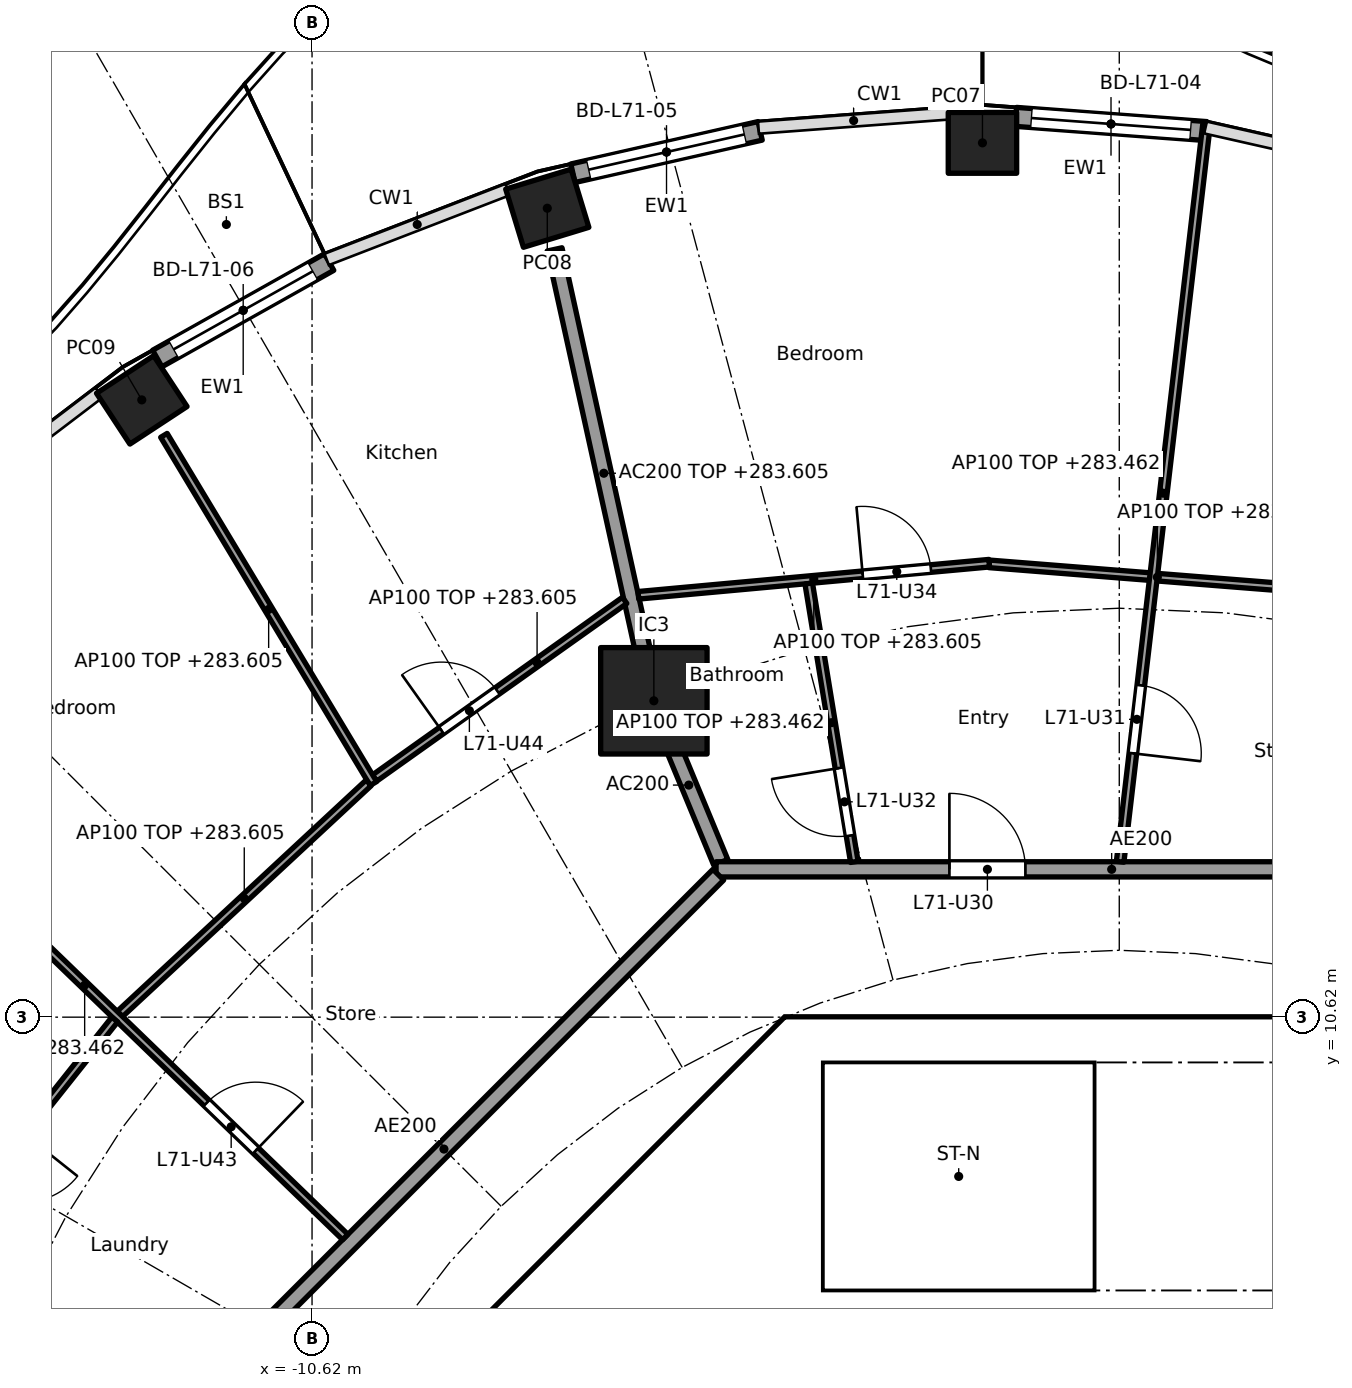
"""IFC4 building model, lengths in metres.
Left out: names, types, materials, properties, quantities, classifications, styles, units other than length and angle.
Written with IfcOpenShell. Run it as: python <this file> out.ifc"""

import sys

from ifc_helpers import new_model, si_unit, direction, frame, frame_2d, origin, origin_2d, place, context, subcontext, project, spatial, polyline, rectangle, hollow_rectangle, outline, extrude, element, fill, save


model = new_model("IFC4")
c1 = context("Model", 3, precision=1e-05, world=origin(), true_north=direction((0.0, 1.0)))
c2 = subcontext(c1, "Body", "Model", "MODEL_VIEW")
j1 = project(units=[si_unit("LENGTHUNIT", "METRE"), si_unit("PLANEANGLEUNIT", "RADIAN")], contexts=[c1])
p1 = place(None, origin())
s1 = spatial("IfcSite", under=j1, at=p1, CompositionType="ELEMENT")
p2 = place(p1, origin())
s2 = spatial("IfcBuilding", under=s1, at=p2, CompositionType="ELEMENT")
p3 = place(p2, frame((0.0, 0.0, 280.7)))
s3 = spatial("IfcBuildingStorey", under=s2, at=p3, CompositionType="ELEMENT", Elevation=280.7)
for number, where, z_axis, x_axis in (
    (1, (-1.8, 22.122, 0.0), (0.0, 0.0, 1.0), (-1.0, 0.0, 0.0)),
    (2, (-7.525, 21.262, 0.0), (0.0, 0.0, 1.0), (-0.957, -0.292, 0.0)),
    (3, (-12.86, 18.741, 0.0), (0.0, 0.0, 1.0), (-0.836, -0.549, 0.0)),
):
    element("IfcColumn", number, at=place(p3, frame(where, z_axis=z_axis, x_axis=x_axis)), inside=s3, PredefinedType="COLUMN", context=c2, shape_type="SweptSolid", body=[
        extrude(hollow_rectangle(XDim=0.9, YDim=0.8, WallThickness=0.028, at=origin_2d()), origin(), (0.0, 0.0, 1.0), 3.7),
    ])
p4 = place(p3, frame((-6.123, 14.782, 0.0), z_axis=(0.0, 0.0, 1.0), x_axis=(1.0, 0.0, 0.0)))
e4 = element("IfcColumn", 4, at=p4, inside=s3, PredefinedType="COLUMN", context=c2, shape_type="SweptSolid", body=[
    extrude(rectangle(XDim=1.4, YDim=1.4, at=origin_2d()), origin(), (0.0, 0.0, 1.0), 3.7),
])
p5 = place(p3, frame((-1.361, 22.464, 0.0), z_axis=(0.0, 0.0, 1.0), x_axis=(0.997229684519, -0.074383844448, 0.0)))
e5 = element("IfcWall", 5, at=p5, inside=s3, PredefinedType="SOLIDWALL", context=c2, shape_type="SweptSolid", body=[
    extrude(rectangle(XDim=2.511, YDim=0.25, at=frame_2d((1.255, 0.0))), origin(), (0.0, 0.0, 1.0), 3.44),
])
p6 = place(p5, frame((0.205, 0.0, 0.0)))
e6 = element("IfcOpeningElement", 6, at=p6, cuts=e5, PredefinedType="OPENING", context=c2, shape_type="SweptSolid", body=[
    extrude(rectangle(XDim=2.1, YDim=2.4, at=frame_2d((1.05, 1.2))), frame((0.0, 0.135, 0.0), z_axis=(0.0, -1.0, 0.0), x_axis=(1.0, 0.0, 0.0)), (0.0, 0.0, 1.0), 0.27),
])
p7 = place(p3, frame((-7.188, 21.723, 0.0), z_axis=(0.0, 0.0, 1.0), x_axis=(0.975319584032, 0.220797891756, 0.0)))
e7 = element("IfcWall", 7, at=p7, inside=s3, PredefinedType="SOLIDWALL", context=c2, shape_type="SweptSolid", body=[
    extrude(rectangle(XDim=2.525, YDim=0.25, at=frame_2d((1.263, 0.0))), origin(), (0.0, 0.0, 1.0), 3.44),
])
p8 = place(p7, frame((0.213, 0.0, 0.0)))
e8 = element("IfcOpeningElement", 8, at=p8, cuts=e7, PredefinedType="OPENING", context=c2, shape_type="SweptSolid", body=[
    extrude(rectangle(XDim=2.1, YDim=2.4, at=frame_2d((1.05, 1.2))), frame((0.0, 0.135, 0.0), z_axis=(0.0, -1.0, 0.0), x_axis=(1.0, 0.0, 0.0)), (0.0, 0.0, 1.0), 0.27),
])
p9 = place(p3, frame((-12.656, 19.285, 0.0), z_axis=(0.0, 0.0, 1.0), x_axis=(0.872075426507, 0.489371485154, 0.0)))
e9 = element("IfcWall", 9, at=p9, inside=s3, PredefinedType="SOLIDWALL", context=c2, shape_type="SweptSolid", body=[
    extrude(rectangle(XDim=2.593, YDim=0.25, at=frame_2d((1.297, 0.0))), origin(), (0.0, 0.0, 1.0), 3.44),
])
p10 = place(p9, frame((0.247, 0.0, 0.0)))
e10 = element("IfcOpeningElement", 10, at=p10, cuts=e9, PredefinedType="OPENING", context=c2, shape_type="SweptSolid", body=[
    extrude(rectangle(XDim=2.1, YDim=2.4, at=frame_2d((1.05, 1.2))), frame((0.0, 0.135, 0.0), z_axis=(0.0, -1.0, 0.0), x_axis=(1.0, 0.0, 0.0)), (0.0, 0.0, 1.0), 0.27),
])
p11 = place(p3, frame((-4.613, 9.988, 0.0), z_axis=(0.0, 0.0, 1.0), x_axis=(-0.707106781187, -0.707106781187, 0.0)))
e11 = element("IfcWall", 11, at=p11, inside=s3, PredefinedType="SHEAR", context=c2, shape_type="SweptSolid", body=[
    extrude(rectangle(XDim=7.602, YDim=0.6, at=frame_2d((3.801, 0.0))), origin(), (0.0, 0.0, 1.0), 3.44),
])
p12 = place(p11, frame((0.351, 0.0, 0.0)))
e12 = element("IfcOpeningElement", 12, at=p12, cuts=e11, PredefinedType="OPENING", context=c2, shape_type="SweptSolid", body=[
    extrude(rectangle(XDim=1.1, YDim=2.1, at=frame_2d((0.55, 1.05))), frame((0.0, 0.31, 0.0), z_axis=(0.0, -1.0, 0.0), x_axis=(1.0, 0.0, 0.0)), (0.0, 0.0, 1.0), 0.62),
])
p13 = place(p3, frame((-5.8, 4.3, 0.0), z_axis=(0.0, 0.0, 1.0), x_axis=(0.0, 1.0, 0.0)))
e13 = element("IfcWall", 13, at=p13, inside=s3, PredefinedType="PARTITIONING", context=c2, shape_type="SweptSolid", body=[
    extrude(rectangle(XDim=3.927, YDim=0.15, at=frame_2d((1.963, 0.0))), origin(), (0.0, 0.0, 1.0), 3.44),
])
p14 = place(p13, frame((0.262, 0.0, 0.0)))
e14 = element("IfcOpeningElement", 14, at=p14, cuts=e13, PredefinedType="OPENING", context=c2, shape_type="SweptSolid", body=[
    extrude(rectangle(XDim=0.9, YDim=2.1, at=frame_2d((0.45, 1.05))), frame((0.0, 0.085, 0.0), z_axis=(0.0, -1.0, 0.0), x_axis=(1.0, 0.0, 0.0)), (0.0, 0.0, 1.0), 0.17),
])
p15 = place(p13, frame((2.338, 0.0, 0.0)))
e15 = element("IfcOpeningElement", 15, at=p15, cuts=e13, PredefinedType="OPENING", context=c2, shape_type="SweptSolid", body=[
    extrude(rectangle(XDim=0.9, YDim=2.1, at=frame_2d((0.45, 1.05))), frame((0.0, 0.085, 0.0), z_axis=(0.0, -1.0, 0.0), x_axis=(1.0, 0.0, 0.0)), (0.0, 0.0, 1.0), 0.17),
])
p16 = place(p3, origin())
e16 = element("IfcWall", 16, at=p16, inside=s3, PredefinedType="SHEAR", context=c2, shape_type="SweptSolid", body=[
    extrude(outline(polyline([(-4.152, 10.025), (-4.401, 9.776), (-4.825, 10.2), (-4.401, 10.625), (4.401, 10.625), (4.825, 10.2), (4.401, 9.776), (4.152, 10.025), (-4.152, 10.025)])), origin(), (0.0, 0.0, 1.0), 3.44),
])
p17 = place(p3, origin())
e17 = element("IfcWall", 17, at=p17, inside=s3, PredefinedType="SOLIDWALL", context=c2, shape_type="SweptSolid", body=[
    extrude(outline(polyline([(-3.9, 7.025), (-4.1, 7.025), (-4.1, 10.025), (-3.9, 10.025), (-3.9, 7.025)])), origin(), (0.0, 0.0, 1.0), 3.44),
])
p18 = place(p3, origin())
e18 = element("IfcWall", 18, at=p18, inside=s3, PredefinedType="SOLIDWALL", context=c2, shape_type="SweptSolid", body=[
    extrude(outline(polyline([(4.1, 6.5), (-4.1, 6.5), (-4.1, 7.025), (4.1, 7.025), (4.1, 6.5)])), origin(), (0.0, 0.0, 1.0), 3.44),
])
p19 = place(p3, frame((-5.243, 12.657, 0.0), z_axis=(0.0, 0.0, 1.0), x_axis=(-0.38273085373, 0.923859888513, 0.0)))
e19 = element("IfcWall", 19, at=p19, inside=s3, PredefinedType="PARTITIONING", context=c2, shape_type="SweptSolid", body=[
    extrude(rectangle(XDim=2.199, YDim=0.2, at=frame_2d((1.1, 0.0))), origin(), (0.0, 0.0, 1.0), 3.44),
])
p20 = place(p3, frame((-6.134, 14.831, 0.0), z_axis=(0.0, 0.0, 1.0), x_axis=(-0.214842475666, 0.976648714047, 0.0)))
e20 = element("IfcWall", 20, at=p20, inside=s3, PredefinedType="PARTITIONING", context=c2, shape_type="SweptSolid", body=[
    extrude(rectangle(XDim=6.031, YDim=0.2, at=frame_2d((3.015, 0.0))), origin(), (0.0, 0.0, 1.0), 2.905),
])
p21 = place(p3, frame((5.104, 12.565, 0.0), z_axis=(0.0, 0.0, 1.0), x_axis=(-1.0, 0.0, 0.0)))
e21 = element("IfcWall", 21, at=p21, inside=s3, PredefinedType="PARTITIONING", context=c2, shape_type="SweptSolid", body=[
    extrude(rectangle(XDim=10.409, YDim=0.2, at=frame_2d((5.205, 0.0))), origin(), (0.0, 0.0, 1.0), 3.44),
])
p22 = place(p21, frame((6.339, 0.0, 0.0)))
e22 = element("IfcOpeningElement", 22, at=p22, cuts=e21, PredefinedType="OPENING", context=c2, shape_type="SweptSolid", body=[
    extrude(rectangle(XDim=1.0, YDim=2.1, at=frame_2d((0.5, 1.05))), frame((0.0, 0.11, 0.0), z_axis=(0.0, -1.0, 0.0), x_axis=(1.0, 0.0, 0.0)), (0.0, 0.0, 1.0), 0.22),
])
p23 = place(p3, frame((-5.275, 12.494, 0.0), z_axis=(0.0, 0.0, 1.0), x_axis=(-0.707106781187, -0.707106781187, 0.0)))
e23 = element("IfcWall", 23, at=p23, inside=s3, PredefinedType="PARTITIONING", context=c2, shape_type="SweptSolid", body=[
    extrude(rectangle(XDim=10.209, YDim=0.2, at=frame_2d((5.104, 0.0))), origin(), (0.0, 0.0, 1.0), 3.44),
])
p24 = place(p3, frame((2.713, 16.233, 0.0), z_axis=(0.0, 0.0, 1.0), x_axis=(-0.996870142942, 0.079056423588, 0.0)))
e24 = element("IfcWall", 24, at=p24, inside=s3, PredefinedType="PARTITIONING", context=c2, shape_type="SweptSolid", body=[
    extrude(rectangle(XDim=4.438, YDim=0.1, at=frame_2d((2.219, 0.0))), origin(), (0.0, 0.0, 1.0), 2.905),
])
p25 = place(p3, frame((0.012, 12.664, 0.0), z_axis=(0.0, 0.0, 1.0), x_axis=(0.11636251357, 0.993206808996, 0.0)))
e25 = element("IfcWall", 25, at=p25, inside=s3, PredefinedType="PARTITIONING", context=c2, shape_type="SweptSolid", body=[
    extrude(rectangle(XDim=9.765, YDim=0.1, at=frame_2d((4.882, 0.0))), origin(), (0.0, 0.0, 1.0), 2.762),
])
p26 = place(p25, frame((1.437, 0.0, 0.0)))
e26 = element("IfcOpeningElement", 26, at=p26, cuts=e25, PredefinedType="OPENING", context=c2, shape_type="SweptSolid", body=[
    extrude(rectangle(XDim=0.9, YDim=2.1, at=frame_2d((0.45, 1.05))), frame((0.0, 0.06, 0.0), z_axis=(0.0, -1.0, 0.0), x_axis=(1.0, 0.0, 0.0)), (0.0, 0.0, 1.0), 0.12),
])
p27 = place(p3, frame((-1.711, 16.592, 0.0), z_axis=(0.0, 0.0, 1.0), x_axis=(-0.995843837247, -0.091077175065, 0.0)))
e27 = element("IfcWall", 27, at=p27, inside=s3, PredefinedType="PARTITIONING", context=c2, shape_type="SweptSolid", body=[
    extrude(rectangle(XDim=4.635, YDim=0.1, at=frame_2d((2.317, 0.0))), origin(), (0.0, 0.0, 1.0), 2.905),
])
p28 = place(p27, frame((0.771, 0.0, 0.0)))
e28 = element("IfcOpeningElement", 28, at=p28, cuts=e27, PredefinedType="OPENING", context=c2, shape_type="SweptSolid", body=[
    extrude(rectangle(XDim=0.9, YDim=2.1, at=frame_2d((0.45, 1.05))), frame((0.0, 0.06, 0.0), z_axis=(0.0, -1.0, 0.0), x_axis=(1.0, 0.0, 0.0)), (0.0, 0.0, 1.0), 0.12),
])
p29 = place(p3, frame((-3.486, 12.663, 0.0), z_axis=(0.0, 0.0, 1.0), x_axis=(-0.161602751674, 0.986855891532, 0.0)))
e29 = element("IfcWall", 29, at=p29, inside=s3, PredefinedType="PARTITIONING", context=c2, shape_type="SweptSolid", body=[
    extrude(rectangle(XDim=3.71, YDim=0.1, at=frame_2d((1.855, 0.0))), origin(), (0.0, 0.0, 1.0), 2.762),
])
p30 = place(p29, frame((0.35, 0.0, 0.0)))
e30 = element("IfcOpeningElement", 30, at=p30, cuts=e29, PredefinedType="OPENING", context=c2, shape_type="SweptSolid", body=[
    extrude(rectangle(XDim=0.9, YDim=2.1, at=frame_2d((0.45, 1.05))), frame((0.0, 0.06, 0.0), z_axis=(0.0, -1.0, 0.0), x_axis=(1.0, 0.0, 0.0)), (0.0, 0.0, 1.0), 0.12),
])
p31 = place(p3, frame((-6.508, 16.103, 0.0), z_axis=(0.0, 0.0, 1.0), x_axis=(-0.815202203556, -0.579176456114, 0.0)))
e31 = element("IfcWall", 31, at=p31, inside=s3, PredefinedType="PARTITIONING", context=c2, shape_type="SweptSolid", body=[
    extrude(rectangle(XDim=4.036, YDim=0.1, at=frame_2d((2.018, 0.0))), origin(), (0.0, 0.0, 1.0), 2.905),
])
p32 = place(p31, frame((2.055, 0.0, 0.0)))
e32 = element("IfcOpeningElement", 32, at=p32, cuts=e31, PredefinedType="OPENING", context=c2, shape_type="SweptSolid", body=[
    extrude(rectangle(XDim=0.9, YDim=2.1, at=frame_2d((0.45, 1.05))), frame((0.0, 0.06, 0.0), z_axis=(0.0, -1.0, 0.0), x_axis=(1.0, 0.0, 0.0)), (0.0, 0.0, 1.0), 0.12),
])
p33 = place(p3, frame((-9.813, 13.693, 0.0), z_axis=(0.0, 0.0, 1.0), x_axis=(-0.515509511815, 0.856883856324, 0.0)))
e33 = element("IfcWall", 33, at=p33, inside=s3, PredefinedType="PARTITIONING", context=c2, shape_type="SweptSolid", body=[
    extrude(rectangle(XDim=5.346, YDim=0.1, at=frame_2d((2.673, 0.0))), origin(), (0.0, 0.0, 1.0), 2.905),
])
p34 = place(p3, frame((-9.875, 13.702, 0.0), z_axis=(0.0, 0.0, 1.0), x_axis=(-0.732618266441, -0.680639754699, 0.0)))
e34 = element("IfcWall", 34, at=p34, inside=s3, PredefinedType="PARTITIONING", context=c2, shape_type="SweptSolid", body=[
    extrude(rectangle(XDim=4.467, YDim=0.1, at=frame_2d((2.233, 0.0))), origin(), (0.0, 0.0, 1.0), 2.905),
])
p35 = place(p3, frame((-10.183, 7.727, 0.0), z_axis=(0.0, 0.0, 1.0), x_axis=(-0.719063433856, 0.694944442449, 0.0)))
e35 = element("IfcWall", 35, at=p35, inside=s3, PredefinedType="PARTITIONING", context=c2, shape_type="SweptSolid", body=[
    extrude(rectangle(XDim=9.535, YDim=0.1, at=frame_2d((4.768, 0.0))), origin(), (0.0, 0.0, 1.0), 2.762),
])
p36 = place(p35, frame((6.405, 0.0, 0.0)))
e36 = element("IfcOpeningElement", 36, at=p36, cuts=e35, PredefinedType="OPENING", context=c2, shape_type="SweptSolid", body=[
    extrude(rectangle(XDim=0.9, YDim=2.1, at=frame_2d((0.45, 1.05))), frame((0.0, 0.06, 0.0), z_axis=(0.0, -1.0, 0.0), x_axis=(1.0, 0.0, 0.0)), (0.0, 0.0, 1.0), 0.12),
])
p37 = place(p35, frame((1.637, 0.0, 0.0)))
e37 = element("IfcOpeningElement", 37, at=p37, cuts=e35, PredefinedType="OPENING", context=c2, shape_type="SweptSolid", body=[
    extrude(rectangle(XDim=0.9, YDim=2.1, at=frame_2d((0.45, 1.05))), frame((0.0, 0.06, 0.0), z_axis=(0.0, -1.0, 0.0), x_axis=(1.0, 0.0, 0.0)), (0.0, 0.0, 1.0), 0.12),
])
p38 = place(p3, frame((-13.216, 10.589, 0.0), z_axis=(0.0, 0.0, 1.0), x_axis=(-0.622272178674, -0.782800955319, 0.0)))
e38 = element("IfcWall", 38, at=p38, inside=s3, PredefinedType="PARTITIONING", context=c2, shape_type="SweptSolid", body=[
    extrude(rectangle(XDim=4.786, YDim=0.1, at=frame_2d((2.393, 0.0))), origin(), (0.0, 0.0, 1.0), 2.905),
])
p39 = place(p38, frame((1.918, 0.0, 0.0)))
e39 = element("IfcOpeningElement", 39, at=p39, cuts=e38, PredefinedType="OPENING", context=c2, shape_type="SweptSolid", body=[
    extrude(rectangle(XDim=0.9, YDim=2.1, at=frame_2d((0.45, 1.05))), frame((0.0, 0.06, 0.0), z_axis=(0.0, -1.0, 0.0), x_axis=(1.0, 0.0, 0.0)), (0.0, 0.0, 1.0), 0.12),
])
p40 = place(p6, origin())
e40 = element("IfcDoor", 40, at=p40, inside=s3, OperationType="SLIDING_TO_LEFT", PredefinedType="DOOR", context=c2, shape_type="SweptSolid", body=[
    extrude(rectangle(XDim=2.1, YDim=2.4, at=frame_2d((1.05, 1.2))), frame((0.0, 0.025, 0.0), z_axis=(0.0, -1.0, 0.0), x_axis=(1.0, 0.0, 0.0)), (0.0, 0.0, 1.0), 0.05),
])
fill(e6, e40)
p41 = place(p8, origin())
e41 = element("IfcDoor", 41, at=p41, inside=s3, OperationType="SLIDING_TO_LEFT", PredefinedType="DOOR", context=c2, shape_type="SweptSolid", body=[
    extrude(rectangle(XDim=2.1, YDim=2.4, at=frame_2d((1.05, 1.2))), frame((0.0, 0.025, 0.0), z_axis=(0.0, -1.0, 0.0), x_axis=(1.0, 0.0, 0.0)), (0.0, 0.0, 1.0), 0.05),
])
fill(e8, e41)
p42 = place(p10, origin())
e42 = element("IfcDoor", 42, at=p42, inside=s3, OperationType="SLIDING_TO_LEFT", PredefinedType="DOOR", context=c2, shape_type="SweptSolid", body=[
    extrude(rectangle(XDim=2.1, YDim=2.4, at=frame_2d((1.05, 1.2))), frame((0.0, 0.025, 0.0), z_axis=(0.0, -1.0, 0.0), x_axis=(1.0, 0.0, 0.0)), (0.0, 0.0, 1.0), 0.05),
])
fill(e10, e42)
p43 = place(p15, origin())
e43 = element("IfcDoor", 43, at=p43, inside=s3, OperationType="SINGLE_SWING_LEFT", PredefinedType="DOOR", context=c2, shape_type="SweptSolid", body=[
    extrude(rectangle(XDim=0.9, YDim=2.1, at=frame_2d((0.45, 1.05))), frame((0.0, 0.025, 0.0), z_axis=(0.0, -1.0, 0.0), x_axis=(1.0, 0.0, 0.0)), (0.0, 0.0, 1.0), 0.05),
])
fill(e15, e43)
p44 = place(p12, origin())
e44 = element("IfcDoor", 44, at=p44, inside=s3, OperationType="SINGLE_SWING_RIGHT", PredefinedType="DOOR", context=c2, shape_type="SweptSolid", body=[
    extrude(rectangle(XDim=1.1, YDim=2.1, at=frame_2d((0.55, 1.05))), frame((0.0, 0.025, 0.0), z_axis=(0.0, -1.0, 0.0), x_axis=(1.0, 0.0, 0.0)), (0.0, 0.0, 1.0), 0.05),
])
fill(e12, e44)
p45 = place(p22, frame((1.0, 0.0, 0.0), x_axis=(-1.0, 0.0, 0.0)))
e45 = element("IfcDoor", 45, at=p45, inside=s3, OperationType="SINGLE_SWING_LEFT", PredefinedType="DOOR", context=c2, shape_type="SweptSolid", body=[
    extrude(rectangle(XDim=1.0, YDim=2.1, at=frame_2d((0.5, 1.05))), frame((0.0, 0.025, 0.0), z_axis=(0.0, -1.0, 0.0), x_axis=(1.0, 0.0, 0.0)), (0.0, 0.0, 1.0), 0.05),
])
fill(e22, e45)
p46 = place(p26, frame((0.9, 0.0, 0.0), x_axis=(-1.0, 0.0, 0.0)))
e46 = element("IfcDoor", 46, at=p46, inside=s3, OperationType="SINGLE_SWING_RIGHT", PredefinedType="DOOR", context=c2, shape_type="SweptSolid", body=[
    extrude(rectangle(XDim=0.9, YDim=2.1, at=frame_2d((0.45, 1.05))), frame((0.0, 0.025, 0.0), z_axis=(0.0, -1.0, 0.0), x_axis=(1.0, 0.0, 0.0)), (0.0, 0.0, 1.0), 0.05),
])
fill(e26, e46)
p47 = place(p30, origin())
e47 = element("IfcDoor", 47, at=p47, inside=s3, OperationType="SINGLE_SWING_RIGHT", PredefinedType="DOOR", context=c2, shape_type="SweptSolid", body=[
    extrude(rectangle(XDim=0.9, YDim=2.1, at=frame_2d((0.45, 1.05))), frame((0.0, 0.025, 0.0), z_axis=(0.0, -1.0, 0.0), x_axis=(1.0, 0.0, 0.0)), (0.0, 0.0, 1.0), 0.05),
])
fill(e30, e47)
p48 = place(p28, frame((0.9, 0.0, 0.0), x_axis=(-1.0, 0.0, 0.0)))
e48 = element("IfcDoor", 48, at=p48, inside=s3, OperationType="SINGLE_SWING_LEFT", PredefinedType="DOOR", context=c2, shape_type="SweptSolid", body=[
    extrude(rectangle(XDim=0.9, YDim=2.1, at=frame_2d((0.45, 1.05))), frame((0.0, 0.025, 0.0), z_axis=(0.0, -1.0, 0.0), x_axis=(1.0, 0.0, 0.0)), (0.0, 0.0, 1.0), 0.05),
])
fill(e28, e48)
p49 = place(p37, frame((0.9, 0.0, 0.0), x_axis=(-1.0, 0.0, 0.0)))
e49 = element("IfcDoor", 49, at=p49, inside=s3, OperationType="SINGLE_SWING_RIGHT", PredefinedType="DOOR", context=c2, shape_type="SweptSolid", body=[
    extrude(rectangle(XDim=0.9, YDim=2.1, at=frame_2d((0.45, 1.05))), frame((0.0, 0.025, 0.0), z_axis=(0.0, -1.0, 0.0), x_axis=(1.0, 0.0, 0.0)), (0.0, 0.0, 1.0), 0.05),
])
fill(e37, e49)
p50 = place(p32, frame((0.9, 0.0, 0.0), x_axis=(-1.0, 0.0, 0.0)))
e50 = element("IfcDoor", 50, at=p50, inside=s3, OperationType="SINGLE_SWING_LEFT", PredefinedType="DOOR", context=c2, shape_type="SweptSolid", body=[
    extrude(rectangle(XDim=0.9, YDim=2.1, at=frame_2d((0.45, 1.05))), frame((0.0, 0.025, 0.0), z_axis=(0.0, -1.0, 0.0), x_axis=(1.0, 0.0, 0.0)), (0.0, 0.0, 1.0), 0.05),
])
fill(e32, e50)
save(model, sys.argv[1])
